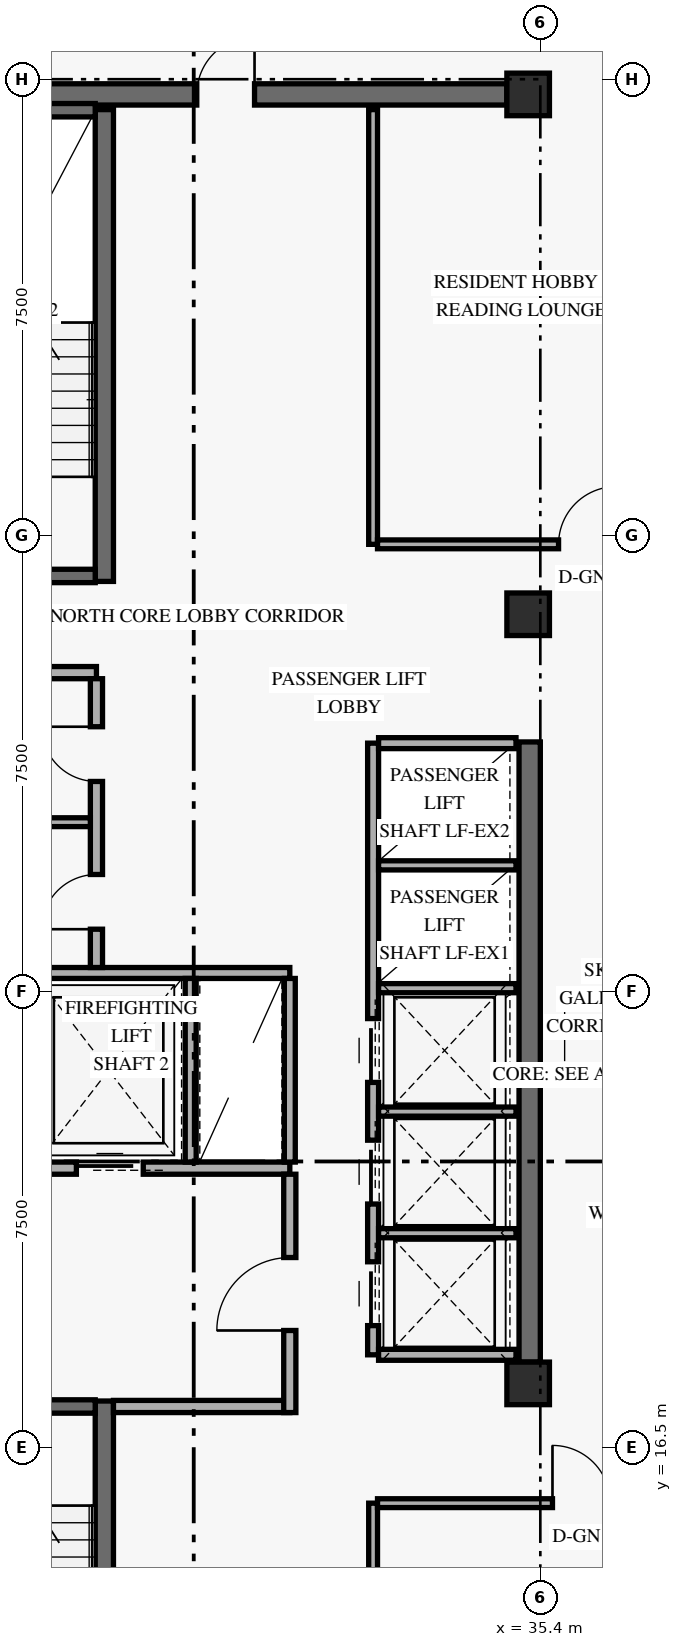
"""IFC4 building model, lengths in metres.
Left out: names, types, materials, properties, quantities, classifications, styles, units other than length and angle.
Written with IfcOpenShell. Run it as: python <this file> out.ifc"""

import sys

from ifc_helpers import new_model, si_unit, direction, frame, frame_2d, origin, origin_2d, place, context, subcontext, project, spatial, rectangle, extrude, element, fill, save


model = new_model("IFC4")
c1 = context("Model", 3, precision=1e-05, world=origin(), true_north=direction((0.0, 1.0)))
c2 = subcontext(c1, "Body", "Model", "MODEL_VIEW")
j1 = project(units=[si_unit("LENGTHUNIT", "METRE"), si_unit("PLANEANGLEUNIT", "RADIAN")], contexts=[c1])
p1 = place(None, origin())
s1 = spatial("IfcSite", under=j1, at=p1, CompositionType="ELEMENT")
p2 = place(p1, origin())
s2 = spatial("IfcBuilding", under=s1, at=p2, CompositionType="ELEMENT")
p3 = place(p2, frame((0.0, 0.0, 264.0)))
s3 = spatial("IfcBuildingStorey", under=s2, at=p3, CompositionType="ELEMENT", Elevation=264.0)
p4 = place(p3, frame((35.225, 17.9, 0.0), z_axis=(0.0, 0.0, 1.0), x_axis=(0.0, 1.0, 0.0)))
e1 = element("IfcWall", 1, at=p4, inside=s3, PredefinedType="SHEAR", context=c2, shape_type="SweptSolid", body=[
    extrude(rectangle(XDim=10.2, YDim=0.35, at=frame_2d((5.1, 0.0))), origin(), (0.0, 0.0, 1.0), 2.821),
])
p5 = place(p3, frame((24.55, 38.75, 0.0), z_axis=(0.0, 0.0, 1.0), x_axis=(1.0, 0.0, 0.0)))
e2 = element("IfcWall", 2, at=p5, inside=s3, PredefinedType="SHEAR", context=c2, shape_type="SweptSolid", body=[
    extrude(rectangle(XDim=10.3, YDim=0.35, at=frame_2d((5.15, 0.0))), origin(), (0.0, 0.0, 1.0), 3.36),
])
p6 = place(p5, frame((5.2, 0.0, 0.0)))
e3 = element("IfcOpeningElement", 3, at=p6, cuts=e2, PredefinedType="OPENING", context=c2, shape_type="SweptSolid", body=[
    extrude(rectangle(XDim=0.95, YDim=2.15, at=frame_2d((0.475, 1.075))), frame((0.0, 0.185, 0.0), z_axis=(0.0, -1.0, 0.0), x_axis=(1.0, 0.0, 0.0)), (0.0, 0.0, 1.0), 0.37),
])
p7 = place(p3, frame((28.23, 9.5, 0.0), z_axis=(0.0, 0.0, 1.0), x_axis=(0.0, 1.0, 0.0)))
e4 = element("IfcWall", 4, at=p7, inside=s3, PredefinedType="SHEAR", context=c2, shape_type="SweptSolid", body=[
    extrude(rectangle(XDim=7.76, YDim=0.3, at=frame_2d((3.88, 0.0))), origin(), (0.0, 0.0, 1.0), 3.36),
])
p8 = place(p3, frame((24.92, 17.17, 0.0), z_axis=(0.0, 0.0, 1.0), x_axis=(1.0, 0.0, 0.0)))
e5 = element("IfcWall", 5, at=p8, inside=s3, PredefinedType="SHEAR", context=c2, shape_type="SweptSolid", body=[
    extrude(rectangle(XDim=3.16, YDim=0.22, at=frame_2d((1.58, 0.0))), origin(), (0.0, 0.0, 1.0), 3.36),
])
p9 = place(p8, frame((0.78, 0.0, 0.0)))
e6 = element("IfcOpeningElement", 6, at=p9, cuts=e5, PredefinedType="OPENING", context=c2, shape_type="SweptSolid", body=[
    extrude(rectangle(XDim=1.05, YDim=2.15, at=frame_2d((0.525, 1.075))), frame((0.0, 0.12, 0.0), z_axis=(0.0, -1.0, 0.0), x_axis=(1.0, 0.0, 0.0)), (0.0, 0.0, 1.0), 0.24),
])
p10 = place(p3, frame((28.23, 30.74, 0.0), z_axis=(0.0, 0.0, 1.0), x_axis=(0.0, 1.0, 0.0)))
e7 = element("IfcWall", 7, at=p10, inside=s3, PredefinedType="SHEAR", context=c2, shape_type="SweptSolid", body=[
    extrude(rectangle(XDim=7.76, YDim=0.3, at=frame_2d((3.88, 0.0))), origin(), (0.0, 0.0, 1.0), 3.36),
])
p11 = place(p3, frame((24.92, 30.83, 0.0), z_axis=(0.0, 0.0, 1.0), x_axis=(1.0, 0.0, 0.0)))
e8 = element("IfcWall", 8, at=p11, inside=s3, PredefinedType="SHEAR", context=c2, shape_type="SweptSolid", body=[
    extrude(rectangle(XDim=3.16, YDim=0.22, at=frame_2d((1.58, 0.0))), origin(), (0.0, 0.0, 1.0), 3.36),
])
p12 = place(p11, frame((0.78, 0.0, 0.0)))
e9 = element("IfcOpeningElement", 9, at=p12, cuts=e8, PredefinedType="OPENING", context=c2, shape_type="SweptSolid", body=[
    extrude(rectangle(XDim=1.05, YDim=2.15, at=frame_2d((0.525, 1.075))), frame((0.0, 0.12, 0.0), z_axis=(0.0, -1.0, 0.0), x_axis=(1.0, 0.0, 0.0)), (0.0, 0.0, 1.0), 0.24),
])
p13 = place(p3, frame((24.92, 38.49, 0.0), z_axis=(0.0, 0.0, 1.0), x_axis=(1.0, 0.0, 0.0)))
e10 = element("IfcWall", 10, at=p13, inside=s3, PredefinedType="SHEAR", context=c2, shape_type="SweptSolid", body=[
    extrude(rectangle(XDim=3.16, YDim=0.22, at=frame_2d((1.58, 0.0))), origin(), (0.0, 0.0, 1.0), 3.36),
])
for number, where, z_axis, x_axis in (
    (11, (35.2, 17.55, 0.0), (0.0, 0.0, 1.0), (1.0, 0.0, 0.0)),
    (12, (35.2, 30.2, 0.0), (0.0, 0.0, 1.0), (1.0, 0.0, 0.0)),
    (13, (35.2, 38.75, 0.0), (0.0, 0.0, 1.0), (1.0, 0.0, 0.0)),
):
    element("IfcColumn", number, at=place(p3, frame(where, z_axis=z_axis, x_axis=x_axis)), inside=s3, PredefinedType="COLUMN", context=c2, shape_type="SweptSolid", body=[
        extrude(rectangle(XDim=0.7, YDim=0.7, at=origin_2d()), origin(), (0.0, 0.0, 1.0), 3.6),
    ])
p14 = place(p3, frame((24.45, 21.09, 0.0), z_axis=(0.0, 0.0, 1.0), x_axis=(1.0, 0.0, 0.0)))
e14 = element("IfcWall", 14, at=p14, inside=s3, PredefinedType="STANDARD", context=c2, shape_type="SweptSolid", body=[
    extrude(rectangle(XDim=6.83, YDim=0.2, at=frame_2d((3.415, 0.0))), origin(), (0.0, 0.0, 1.0), 3.36),
])
p15 = place(p14, frame((0.72, 0.0, 0.0)))
e15 = element("IfcOpeningElement", 15, at=p15, cuts=e14, PredefinedType="OPENING", context=c2, shape_type="SweptSolid", body=[
    extrude(rectangle(XDim=1.1, YDim=2.2, at=frame_2d((0.55, 1.1))), frame((0.0, 0.11, 0.0), z_axis=(0.0, -1.0, 0.0), x_axis=(1.0, 0.0, 0.0)), (0.0, 0.0, 1.0), 0.22),
])
p16 = place(p14, frame((3.32, 0.0, 0.0)))
e16 = element("IfcOpeningElement", 16, at=p16, cuts=e14, PredefinedType="OPENING", context=c2, shape_type="SweptSolid", body=[
    extrude(rectangle(XDim=1.1, YDim=2.2, at=frame_2d((0.55, 1.1))), frame((0.0, 0.11, 0.0), z_axis=(0.0, -1.0, 0.0), x_axis=(1.0, 0.0, 0.0)), (0.0, 0.0, 1.0), 0.22),
])
p17 = place(p3, frame((28.38, 17.17, 0.0), z_axis=(0.0, 0.0, 1.0), x_axis=(1.0, 0.0, 0.0)))
e17 = element("IfcWall", 17, at=p17, inside=s3, PredefinedType="STANDARD", context=c2, shape_type="SweptSolid", body=[
    extrude(rectangle(XDim=2.9, YDim=0.2, at=frame_2d((1.45, 0.0))), origin(), (0.0, 0.0, 1.0), 3.36),
])
p18 = place(p3, frame((31.28, 17.07, 0.0), z_axis=(0.0, 0.0, 1.0), x_axis=(0.0, 1.0, 0.0)))
e18 = element("IfcWall", 18, at=p18, inside=s3, PredefinedType="STANDARD", context=c2, shape_type="SweptSolid", body=[
    extrude(rectangle(XDim=3.92, YDim=0.2, at=frame_2d((1.96, 0.0))), origin(), (0.0, 0.0, 1.0), 2.803),
])
p19 = place(p18, frame((1.35, 0.0, 0.0)))
e19 = element("IfcOpeningElement", 19, at=p19, cuts=e18, PredefinedType="OPENING", context=c2, shape_type="SweptSolid", body=[
    extrude(rectangle(XDim=1.2, YDim=2.15, at=frame_2d((0.6, 1.075))), frame((0.0, 0.11, 0.0), z_axis=(0.0, -1.0, 0.0), x_axis=(1.0, 0.0, 0.0)), (0.0, 0.0, 1.0), 0.22),
])
p20 = place(p3, frame((24.45, 24.3, 0.0), z_axis=(0.0, 0.0, 1.0), x_axis=(1.0, 0.0, 0.0)))
e20 = element("IfcWall", 20, at=p20, inside=s3, PredefinedType="STANDARD", context=c2, shape_type="SweptSolid", body=[
    extrude(rectangle(XDim=6.83, YDim=0.18, at=frame_2d((3.415, 0.0))), origin(), (0.0, 0.0, 1.0), 3.36),
])
for number, where, z_axis, x_axis in (
    (21, (29.65, 21.19, 0.0), (0.0, 0.0, 1.0), (0.0, 1.0, 0.0)),
    (22, (31.28, 21.19, 0.0), (0.0, 0.0, 1.0), (0.0, 1.0, 0.0)),
):
    element("IfcWall", number, at=place(p3, frame(where, z_axis=z_axis, x_axis=x_axis)), inside=s3, PredefinedType="STANDARD", context=c2, shape_type="SweptSolid", body=[
        extrude(rectangle(XDim=3.02, YDim=0.18, at=frame_2d((1.51, 0.0))), origin(), (0.0, 0.0, 1.0), 3.36),
    ])
p21 = place(p3, frame((24.45, 29.24, 0.0), z_axis=(0.0, 0.0, 1.0), x_axis=(1.0, 0.0, 0.0)))
e23 = element("IfcWall", 23, at=p21, inside=s3, PredefinedType="STANDARD", context=c2, shape_type="SweptSolid", body=[
    extrude(rectangle(XDim=3.65, YDim=0.2, at=frame_2d((1.825, 0.0))), origin(), (0.0, 0.0, 1.0), 3.36),
])
p22 = place(p3, frame((28.1, 24.39, 0.0), z_axis=(0.0, 0.0, 1.0), x_axis=(0.0, 1.0, 0.0)))
e24 = element("IfcWall", 24, at=p22, inside=s3, PredefinedType="STANDARD", context=c2, shape_type="SweptSolid", body=[
    extrude(rectangle(XDim=4.75, YDim=0.2, at=frame_2d((2.375, 0.0))), origin(), (0.0, 0.0, 1.0), 3.36),
])
p23 = place(p22, frame((0.63, 0.0, 0.0)))
e25 = element("IfcOpeningElement", 25, at=p23, cuts=e24, PredefinedType="OPENING", context=c2, shape_type="SweptSolid", body=[
    extrude(rectangle(XDim=0.9, YDim=2.1, at=frame_2d((0.45, 1.05))), frame((0.0, 0.11, 0.0), z_axis=(0.0, -1.0, 0.0), x_axis=(1.0, 0.0, 0.0)), (0.0, 0.0, 1.0), 0.22),
])
p24 = place(p22, frame((3.06, 0.0, 0.0)))
e26 = element("IfcOpeningElement", 26, at=p24, cuts=e24, PredefinedType="OPENING", context=c2, shape_type="SweptSolid", body=[
    extrude(rectangle(XDim=0.9, YDim=2.1, at=frame_2d((0.45, 1.05))), frame((0.0, 0.11, 0.0), z_axis=(0.0, -1.0, 0.0), x_axis=(1.0, 0.0, 0.0)), (0.0, 0.0, 1.0), 0.22),
])
p25 = place(p3, frame((24.45, 26.78, 0.0), z_axis=(0.0, 0.0, 1.0), x_axis=(1.0, 0.0, 0.0)))
e27 = element("IfcWall", 27, at=p25, inside=s3, PredefinedType="PARTITIONING", context=c2, shape_type="SweptSolid", body=[
    extrude(rectangle(XDim=3.55, YDim=0.145, at=frame_2d((1.775, 0.0))), origin(), (0.0, 0.0, 1.0), 3.36),
])
p26 = place(p3, frame((32.65, 18.02, 0.0), z_axis=(0.0, 0.0, 1.0), x_axis=(0.0, 1.0, 0.0)))
e28 = element("IfcWall", 28, at=p26, inside=s3, PredefinedType="STANDARD", context=c2, shape_type="SweptSolid", body=[
    extrude(rectangle(XDim=10.06, YDim=0.18, at=frame_2d((5.03, 0.0))), origin(), (0.0, 0.0, 1.0), 3.36),
])
p27 = place(p26, frame((0.48, 0.0, 0.0)))
e29 = element("IfcOpeningElement", 29, at=p27, cuts=e28, PredefinedType="OPENING", context=c2, shape_type="SweptSolid", body=[
    extrude(rectangle(XDim=1.05, YDim=2.2, at=frame_2d((0.525, 1.1))), frame((0.0, 0.1, 0.0), z_axis=(0.0, -1.0, 0.0), x_axis=(1.0, 0.0, 0.0)), (0.0, 0.0, 1.0), 0.2),
])
p28 = place(p26, frame((2.48, 0.0, 0.0)))
e30 = element("IfcOpeningElement", 30, at=p28, cuts=e28, PredefinedType="OPENING", context=c2, shape_type="SweptSolid", body=[
    extrude(rectangle(XDim=1.05, YDim=2.2, at=frame_2d((0.525, 1.1))), frame((0.0, 0.1, 0.0), z_axis=(0.0, -1.0, 0.0), x_axis=(1.0, 0.0, 0.0)), (0.0, 0.0, 1.0), 0.2),
])
p29 = place(p26, frame((4.48, 0.0, 0.0)))
e31 = element("IfcOpeningElement", 31, at=p29, cuts=e28, PredefinedType="OPENING", context=c2, shape_type="SweptSolid", body=[
    extrude(rectangle(XDim=1.05, YDim=2.2, at=frame_2d((0.525, 1.1))), frame((0.0, 0.1, 0.0), z_axis=(0.0, -1.0, 0.0), x_axis=(1.0, 0.0, 0.0)), (0.0, 0.0, 1.0), 0.2),
])
for number, where, z_axis, x_axis in (
    (32, (32.74, 18.02, 0.0), (0.0, 0.0, 1.0), (1.0, 0.0, 0.0)),
    (33, (32.74, 28.08, 0.0), (0.0, 0.0, 1.0), (1.0, 0.0, 0.0)),
):
    element("IfcWall", number, at=place(p3, frame(where, z_axis=z_axis, x_axis=x_axis)), inside=s3, PredefinedType="STANDARD", context=c2, shape_type="SweptSolid", body=[
        extrude(rectangle(XDim=2.26, YDim=0.18, at=frame_2d((1.13, 0.0))), origin(), (0.0, 0.0, 1.0), 3.36),
    ])
for number, where, z_axis, x_axis in (
    (34, (32.74, 20.02, 0.0), (0.0, 0.0, 1.0), (1.0, 0.0, 0.0)),
    (35, (32.74, 22.02, 0.0), (0.0, 0.0, 1.0), (1.0, 0.0, 0.0)),
    (36, (32.74, 24.05, 0.0), (0.0, 0.0, 1.0), (1.0, 0.0, 0.0)),
    (37, (32.74, 26.07, 0.0), (0.0, 0.0, 1.0), (1.0, 0.0, 0.0)),
):
    element("IfcWall", number, at=place(p3, frame(where, z_axis=z_axis, x_axis=x_axis)), inside=s3, PredefinedType="STANDARD", context=c2, shape_type="SweptSolid", body=[
        extrude(rectangle(XDim=2.26, YDim=0.15, at=frame_2d((1.13, 0.0))), origin(), (0.0, 0.0, 1.0), 3.36),
    ])
p30 = place(p3, frame((32.65, 9.5, 0.0), z_axis=(0.0, 0.0, 1.0), x_axis=(0.0, 1.0, 0.0)))
e38 = element("IfcWall", 38, at=p30, inside=s3, PredefinedType="PARTITIONING", context=c2, shape_type="SweptSolid", body=[
    extrude(rectangle(XDim=6.08, YDim=0.145, at=frame_2d((3.04, 0.0))), origin(), (0.0, 0.0, 1.0), 3.36),
])
p31 = place(p3, frame((32.722, 15.58, 0.0), z_axis=(0.0, 0.0, 1.0), x_axis=(1.0, 0.0, 0.0)))
e39 = element("IfcWall", 39, at=p31, inside=s3, PredefinedType="PARTITIONING", context=c2, shape_type="SweptSolid", body=[
    extrude(rectangle(XDim=4.828, YDim=0.145, at=frame_2d((2.414, 0.0))), origin(), (0.0, 0.0, 1.0), 2.803),
])
p32 = place(p31, frame((2.877, 0.0, 0.0)))
e40 = element("IfcOpeningElement", 40, at=p32, cuts=e39, PredefinedType="OPENING", context=c2, shape_type="SweptSolid", body=[
    extrude(rectangle(XDim=0.95, YDim=2.15, at=frame_2d((0.475, 1.075))), frame((0.0, 0.083, 0.0), z_axis=(0.0, -1.0, 0.0), x_axis=(1.0, 0.0, 0.0)), (0.0, 0.0, 1.0), 0.165),
])
p33 = place(p3, frame((32.65, 31.35, 0.0), z_axis=(0.0, 0.0, 1.0), x_axis=(0.0, 1.0, 0.0)))
e41 = element("IfcWall", 41, at=p33, inside=s3, PredefinedType="PARTITIONING", context=c2, shape_type="SweptSolid", body=[
    extrude(rectangle(XDim=7.15, YDim=0.145, at=frame_2d((3.575, 0.0))), origin(), (0.0, 0.0, 1.0), 3.36),
])
p34 = place(p3, frame((32.722, 31.35, 0.0), z_axis=(0.0, 0.0, 1.0), x_axis=(1.0, 0.0, 0.0)))
e42 = element("IfcWall", 42, at=p34, inside=s3, PredefinedType="PARTITIONING", context=c2, shape_type="SweptSolid", body=[
    extrude(rectangle(XDim=5.378, YDim=0.145, at=frame_2d((2.689, 0.0))), origin(), (0.0, 0.0, 1.0), 2.803),
])
p35 = place(p34, frame((2.978, 0.0, 0.0)))
e43 = element("IfcOpeningElement", 43, at=p35, cuts=e42, PredefinedType="OPENING", context=c2, shape_type="SweptSolid", body=[
    extrude(rectangle(XDim=0.95, YDim=2.15, at=frame_2d((0.475, 1.075))), frame((0.0, 0.083, 0.0), z_axis=(0.0, -1.0, 0.0), x_axis=(1.0, 0.0, 0.0)), (0.0, 0.0, 1.0), 0.165),
])
p36 = place(p16, origin())
e44 = element("IfcDoor", 44, at=p36, inside=s3, OperationType="SLIDING_TO_LEFT", PredefinedType="DOOR", context=c2, shape_type="SweptSolid", body=[
    extrude(rectangle(XDim=1.1, YDim=2.2, at=frame_2d((0.55, 1.1))), frame((0.0, 0.025, 0.0), z_axis=(0.0, -1.0, 0.0), x_axis=(1.0, 0.0, 0.0)), (0.0, 0.0, 1.0), 0.05),
])
fill(e16, e44)
p37 = place(p19, origin())
e45 = element("IfcDoor", 45, at=p37, inside=s3, OperationType="SINGLE_SWING_LEFT", PredefinedType="DOOR", context=c2, shape_type="SweptSolid", body=[
    extrude(rectangle(XDim=1.2, YDim=2.15, at=frame_2d((0.6, 1.075))), frame((0.0, 0.025, 0.0), z_axis=(0.0, -1.0, 0.0), x_axis=(1.0, 0.0, 0.0)), (0.0, 0.0, 1.0), 0.05),
])
fill(e19, e45)
p38 = place(p23, origin())
e46 = element("IfcDoor", 46, at=p38, inside=s3, OperationType="SINGLE_SWING_LEFT", PredefinedType="DOOR", context=c2, shape_type="SweptSolid", body=[
    extrude(rectangle(XDim=0.9, YDim=2.1, at=frame_2d((0.45, 1.05))), frame((0.0, 0.025, 0.0), z_axis=(0.0, -1.0, 0.0), x_axis=(1.0, 0.0, 0.0)), (0.0, 0.0, 1.0), 0.05),
])
fill(e25, e46)
p39 = place(p24, origin())
e47 = element("IfcDoor", 47, at=p39, inside=s3, OperationType="SINGLE_SWING_RIGHT", PredefinedType="DOOR", context=c2, shape_type="SweptSolid", body=[
    extrude(rectangle(XDim=0.9, YDim=2.1, at=frame_2d((0.45, 1.05))), frame((0.0, 0.025, 0.0), z_axis=(0.0, -1.0, 0.0), x_axis=(1.0, 0.0, 0.0)), (0.0, 0.0, 1.0), 0.05),
])
fill(e26, e47)
p40 = place(p27, origin())
e48 = element("IfcDoor", 48, at=p40, inside=s3, OperationType="SLIDING_TO_LEFT", PredefinedType="DOOR", context=c2, shape_type="SweptSolid", body=[
    extrude(rectangle(XDim=1.05, YDim=2.2, at=frame_2d((0.525, 1.1))), frame((0.0, 0.025, 0.0), z_axis=(0.0, -1.0, 0.0), x_axis=(1.0, 0.0, 0.0)), (0.0, 0.0, 1.0), 0.05),
])
fill(e29, e48)
p41 = place(p28, origin())
e49 = element("IfcDoor", 49, at=p41, inside=s3, OperationType="SLIDING_TO_LEFT", PredefinedType="DOOR", context=c2, shape_type="SweptSolid", body=[
    extrude(rectangle(XDim=1.05, YDim=2.2, at=frame_2d((0.525, 1.1))), frame((0.0, 0.025, 0.0), z_axis=(0.0, -1.0, 0.0), x_axis=(1.0, 0.0, 0.0)), (0.0, 0.0, 1.0), 0.05),
])
fill(e30, e49)
p42 = place(p29, origin())
e50 = element("IfcDoor", 50, at=p42, inside=s3, OperationType="SLIDING_TO_LEFT", PredefinedType="DOOR", context=c2, shape_type="SweptSolid", body=[
    extrude(rectangle(XDim=1.05, YDim=2.2, at=frame_2d((0.525, 1.1))), frame((0.0, 0.025, 0.0), z_axis=(0.0, -1.0, 0.0), x_axis=(1.0, 0.0, 0.0)), (0.0, 0.0, 1.0), 0.05),
])
fill(e31, e50)
p43 = place(p32, origin())
e51 = element("IfcDoor", 51, at=p43, inside=s3, OperationType="SINGLE_SWING_LEFT", PredefinedType="DOOR", context=c2, shape_type="SweptSolid", body=[
    extrude(rectangle(XDim=0.95, YDim=2.15, at=frame_2d((0.475, 1.075))), frame((0.0, 0.025, 0.0), z_axis=(0.0, -1.0, 0.0), x_axis=(1.0, 0.0, 0.0)), (0.0, 0.0, 1.0), 0.05),
])
fill(e40, e51)
p44 = place(p35, origin())
e52 = element("IfcDoor", 52, at=p44, inside=s3, OperationType="SINGLE_SWING_RIGHT", PredefinedType="DOOR", context=c2, shape_type="SweptSolid", body=[
    extrude(rectangle(XDim=0.95, YDim=2.15, at=frame_2d((0.475, 1.075))), frame((0.0, 0.025, 0.0), z_axis=(0.0, -1.0, 0.0), x_axis=(1.0, 0.0, 0.0)), (0.0, 0.0, 1.0), 0.05),
])
fill(e43, e52)
p45 = place(p6, origin())
e53 = element("IfcDoor", 53, at=p45, inside=s3, OperationType="SINGLE_SWING_RIGHT", PredefinedType="DOOR", context=c2, shape_type="SweptSolid", body=[
    extrude(rectangle(XDim=0.95, YDim=2.15, at=frame_2d((0.475, 1.075))), frame((0.0, 0.025, 0.0), z_axis=(0.0, -1.0, 0.0), x_axis=(1.0, 0.0, 0.0)), (0.0, 0.0, 1.0), 0.05),
])
fill(e3, e53)
save(model, sys.argv[1])
